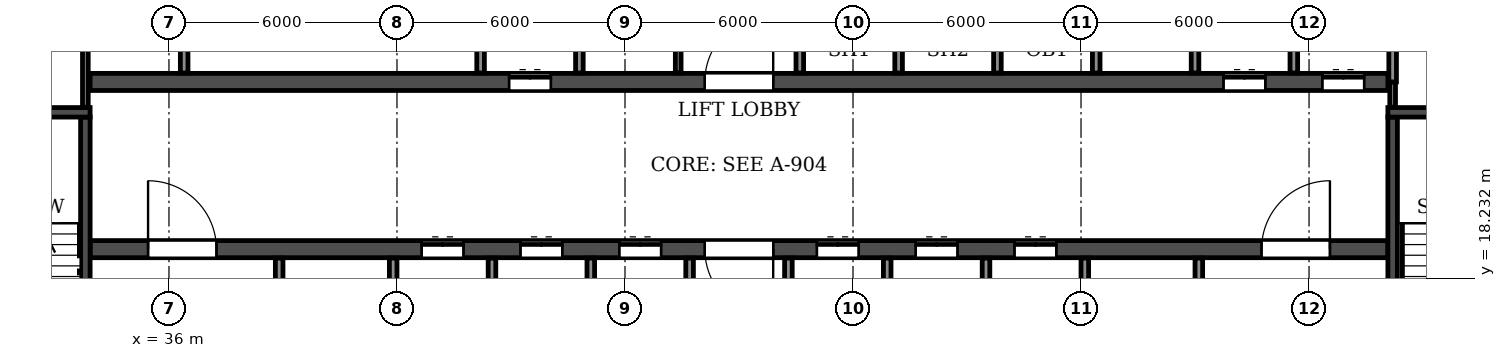
"""IFC4 building model, lengths in metres.
Left out: names, types, materials, properties, quantities, classifications, styles, units other than length and angle.
Written with IfcOpenShell. Run it as: python <this file> out.ifc"""

import sys

from ifc_helpers import new_model, si_unit, direction, frame, frame_2d, origin, place, context, subcontext, project, spatial, rectangle, extrude, element, fill, save


model = new_model("IFC4")
c1 = context("Model", 3, precision=1e-05, world=origin(), true_north=direction((0.0, 1.0)))
c2 = subcontext(c1, "Body", "Model", "MODEL_VIEW")
j1 = project(units=[si_unit("LENGTHUNIT", "METRE"), si_unit("PLANEANGLEUNIT", "RADIAN")], contexts=[c1])
p1 = place(None, origin())
s1 = spatial("IfcSite", under=j1, at=p1, CompositionType="ELEMENT")
p2 = place(p1, origin())
s2 = spatial("IfcBuilding", under=s1, at=p2, CompositionType="ELEMENT")
p3 = place(p2, frame((0.0, 0.0, 15.0)))
s3 = spatial("IfcBuildingStorey", under=s2, at=p3, CompositionType="ELEMENT", Elevation=15.0)
p4 = place(p3, frame((33.925, 19.0, 0.0), z_axis=(0.0, 0.0, 1.0), x_axis=(1.0, 0.0, 0.0)))
e1 = element("IfcWall", 1, at=p4, inside=s3, PredefinedType="SOLIDWALL", context=c2, shape_type="SweptSolid", body=[
    extrude(rectangle(XDim=34.15, YDim=0.45, at=frame_2d((17.075, 0.0))), origin(), (0.0, 0.0, 1.0), 3.92),
])
p5 = place(p4, frame((16.175, 0.0, 0.0)))
e2 = element("IfcOpeningElement", 2, at=p5, cuts=e1, PredefinedType="OPENING", context=c2, shape_type="SweptSolid", body=[
    extrude(rectangle(XDim=1.8, YDim=2.1, at=frame_2d((0.9, 1.05))), frame((0.0, 0.235, 0.0), z_axis=(0.0, -1.0, 0.0), x_axis=(1.0, 0.0, 0.0)), (0.0, 0.0, 1.0), 0.47),
])
p6 = place(p4, frame((1.525, 0.0, 0.0)))
e3 = element("IfcOpeningElement", 3, at=p6, cuts=e1, PredefinedType="OPENING", context=c2, shape_type="SweptSolid", body=[
    extrude(rectangle(XDim=1.8, YDim=2.1, at=frame_2d((0.9, 1.05))), frame((0.0, 0.235, 0.0), z_axis=(0.0, -1.0, 0.0), x_axis=(1.0, 0.0, 0.0)), (0.0, 0.0, 1.0), 0.47),
])
p7 = place(p4, frame((8.725, 0.0, 0.0)))
e4 = element("IfcOpeningElement", 4, at=p7, cuts=e1, PredefinedType="OPENING", context=c2, shape_type="SweptSolid", body=[
    extrude(rectangle(XDim=1.1, YDim=2.1, at=frame_2d((0.55, 1.05))), frame((0.0, 0.235, 0.0), z_axis=(0.0, -1.0, 0.0), x_axis=(1.0, 0.0, 0.0)), (0.0, 0.0, 1.0), 0.47),
])
p8 = place(p4, frame((11.325, 0.0, 0.0)))
e5 = element("IfcOpeningElement", 5, at=p8, cuts=e1, PredefinedType="OPENING", context=c2, shape_type="SweptSolid", body=[
    extrude(rectangle(XDim=1.1, YDim=2.1, at=frame_2d((0.55, 1.05))), frame((0.0, 0.235, 0.0), z_axis=(0.0, -1.0, 0.0), x_axis=(1.0, 0.0, 0.0)), (0.0, 0.0, 1.0), 0.47),
])
p9 = place(p4, frame((13.925, 0.0, 0.0)))
e6 = element("IfcOpeningElement", 6, at=p9, cuts=e1, PredefinedType="OPENING", context=c2, shape_type="SweptSolid", body=[
    extrude(rectangle(XDim=1.1, YDim=2.1, at=frame_2d((0.55, 1.05))), frame((0.0, 0.235, 0.0), z_axis=(0.0, -1.0, 0.0), x_axis=(1.0, 0.0, 0.0)), (0.0, 0.0, 1.0), 0.47),
])
p10 = place(p4, frame((19.125, 0.0, 0.0)))
e7 = element("IfcOpeningElement", 7, at=p10, cuts=e1, PredefinedType="OPENING", context=c2, shape_type="SweptSolid", body=[
    extrude(rectangle(XDim=1.1, YDim=2.1, at=frame_2d((0.55, 1.05))), frame((0.0, 0.235, 0.0), z_axis=(0.0, -1.0, 0.0), x_axis=(1.0, 0.0, 0.0)), (0.0, 0.0, 1.0), 0.47),
])
p11 = place(p4, frame((21.725, 0.0, 0.0)))
e8 = element("IfcOpeningElement", 8, at=p11, cuts=e1, PredefinedType="OPENING", context=c2, shape_type="SweptSolid", body=[
    extrude(rectangle(XDim=1.1, YDim=2.1, at=frame_2d((0.55, 1.05))), frame((0.0, 0.235, 0.0), z_axis=(0.0, -1.0, 0.0), x_axis=(1.0, 0.0, 0.0)), (0.0, 0.0, 1.0), 0.47),
])
p12 = place(p4, frame((24.325, 0.0, 0.0)))
e9 = element("IfcOpeningElement", 9, at=p12, cuts=e1, PredefinedType="OPENING", context=c2, shape_type="SweptSolid", body=[
    extrude(rectangle(XDim=1.1, YDim=2.1, at=frame_2d((0.55, 1.05))), frame((0.0, 0.235, 0.0), z_axis=(0.0, -1.0, 0.0), x_axis=(1.0, 0.0, 0.0)), (0.0, 0.0, 1.0), 0.47),
])
p13 = place(p4, frame((30.825, 0.0, 0.0)))
e10 = element("IfcOpeningElement", 10, at=p13, cuts=e1, PredefinedType="OPENING", context=c2, shape_type="SweptSolid", body=[
    extrude(rectangle(XDim=1.8, YDim=2.1, at=frame_2d((0.9, 1.05))), frame((0.0, 0.235, 0.0), z_axis=(0.0, -1.0, 0.0), x_axis=(1.0, 0.0, 0.0)), (0.0, 0.0, 1.0), 0.47),
])
p14 = place(p3, frame((33.925, 23.4, 0.0), z_axis=(0.0, 0.0, 1.0), x_axis=(1.0, 0.0, 0.0)))
e11 = element("IfcWall", 11, at=p14, inside=s3, PredefinedType="SOLIDWALL", context=c2, shape_type="SweptSolid", body=[
    extrude(rectangle(XDim=34.15, YDim=0.45, at=frame_2d((17.075, 0.0))), origin(), (0.0, 0.0, 1.0), 3.92),
])
p15 = place(p14, frame((16.175, 0.0, 0.0)))
e12 = element("IfcOpeningElement", 12, at=p15, cuts=e11, PredefinedType="OPENING", context=c2, shape_type="SweptSolid", body=[
    extrude(rectangle(XDim=1.8, YDim=2.1, at=frame_2d((0.9, 1.05))), frame((0.0, 0.235, 0.0), z_axis=(0.0, -1.0, 0.0), x_axis=(1.0, 0.0, 0.0)), (0.0, 0.0, 1.0), 0.47),
])
p16 = place(p14, frame((11.025, 0.0, 0.0)))
e13 = element("IfcOpeningElement", 13, at=p16, cuts=e11, PredefinedType="OPENING", context=c2, shape_type="SweptSolid", body=[
    extrude(rectangle(XDim=1.1, YDim=2.1, at=frame_2d((0.55, 1.05))), frame((0.0, 0.235, 0.0), z_axis=(0.0, -1.0, 0.0), x_axis=(1.0, 0.0, 0.0)), (0.0, 0.0, 1.0), 0.47),
])
p17 = place(p14, frame((29.825, 0.0, 0.0)))
e14 = element("IfcOpeningElement", 14, at=p17, cuts=e11, PredefinedType="OPENING", context=c2, shape_type="SweptSolid", body=[
    extrude(rectangle(XDim=1.1, YDim=2.1, at=frame_2d((0.55, 1.05))), frame((0.0, 0.235, 0.0), z_axis=(0.0, -1.0, 0.0), x_axis=(1.0, 0.0, 0.0)), (0.0, 0.0, 1.0), 0.47),
])
p18 = place(p14, frame((32.425, 0.0, 0.0)))
e15 = element("IfcOpeningElement", 15, at=p18, cuts=e11, PredefinedType="OPENING", context=c2, shape_type="SweptSolid", body=[
    extrude(rectangle(XDim=1.1, YDim=2.1, at=frame_2d((0.55, 1.05))), frame((0.0, 0.235, 0.0), z_axis=(0.0, -1.0, 0.0), x_axis=(1.0, 0.0, 0.0)), (0.0, 0.0, 1.0), 0.47),
])
p19 = place(p3, frame((33.8, 14.825, 0.0), z_axis=(0.0, 0.0, 1.0), x_axis=(0.0, 1.0, 0.0)))
e16 = element("IfcWall", 16, at=p19, inside=s3, PredefinedType="SOLIDWALL", context=c2, shape_type="SweptSolid", body=[
    extrude(rectangle(XDim=7.65, YDim=0.25, at=frame_2d((3.825, 0.0))), origin(), (0.0, 0.0, 1.0), 3.92),
])
p20 = place(p19, frame((0.475, 0.0, 0.0)))
e17 = element("IfcOpeningElement", 17, at=p20, cuts=e16, PredefinedType="OPENING", context=c2, shape_type="SweptSolid", body=[
    extrude(rectangle(XDim=1.0, YDim=2.1, at=frame_2d((0.5, 1.05))), frame((0.0, 0.135, 0.0), z_axis=(0.0, -1.0, 0.0), x_axis=(1.0, 0.0, 0.0)), (0.0, 0.0, 1.0), 0.27),
])
p21 = place(p3, frame((29.875, 22.6, 0.0), z_axis=(0.0, 0.0, 1.0), x_axis=(1.0, 0.0, 0.0)))
e18 = element("IfcWall", 18, at=p21, inside=s3, PredefinedType="SOLIDWALL", context=c2, shape_type="SweptSolid", body=[
    extrude(rectangle(XDim=4.05, YDim=0.25, at=frame_2d((2.025, 0.0))), origin(), (0.0, 0.0, 1.0), 3.92),
])
p22 = place(p3, frame((68.2, 14.825, 0.0), z_axis=(0.0, 0.0, 1.0), x_axis=(0.0, 1.0, 0.0)))
e19 = element("IfcWall", 19, at=p22, inside=s3, PredefinedType="SOLIDWALL", context=c2, shape_type="SweptSolid", body=[
    extrude(rectangle(XDim=7.65, YDim=0.25, at=frame_2d((3.825, 0.0))), origin(), (0.0, 0.0, 1.0), 3.92),
])
p23 = place(p22, frame((0.475, 0.0, 0.0)))
e20 = element("IfcOpeningElement", 20, at=p23, cuts=e19, PredefinedType="OPENING", context=c2, shape_type="SweptSolid", body=[
    extrude(rectangle(XDim=1.0, YDim=2.1, at=frame_2d((0.5, 1.05))), frame((0.0, 0.135, 0.0), z_axis=(0.0, -1.0, 0.0), x_axis=(1.0, 0.0, 0.0)), (0.0, 0.0, 1.0), 0.27),
])
p24 = place(p3, frame((68.075, 22.6, 0.0), z_axis=(0.0, 0.0, 1.0), x_axis=(1.0, 0.0, 0.0)))
e21 = element("IfcWall", 21, at=p24, inside=s3, PredefinedType="SOLIDWALL", context=c2, shape_type="SweptSolid", body=[
    extrude(rectangle(XDim=4.05, YDim=0.25, at=frame_2d((2.025, 0.0))), origin(), (0.0, 0.0, 1.0), 3.92),
])
p25 = place(p3, frame((49.4, 23.635, 0.0), z_axis=(0.0, 0.0, 1.0), x_axis=(0.0, 1.0, 0.0)))
e22 = element("IfcWall", 22, at=p25, inside=s3, PredefinedType="PARTITIONING", context=c2, shape_type="SweptSolid", body=[
    extrude(rectangle(XDim=3.93, YDim=0.15, at=frame_2d((1.965, 0.0))), origin(), (0.0, 0.0, 1.0), 3.92),
])
p26 = place(p3, frame((36.4, 23.635, 0.0), z_axis=(0.0, 0.0, 1.0), x_axis=(0.0, 1.0, 0.0)))
e23 = element("IfcWall", 23, at=p26, inside=s3, PredefinedType="PARTITIONING", context=c2, shape_type="SweptSolid", body=[
    extrude(rectangle(XDim=3.93, YDim=0.2, at=frame_2d((1.965, 0.0))), origin(), (0.0, 0.0, 1.0), 3.92),
])
p27 = place(p3, frame((33.8, 22.735, 0.0), z_axis=(0.0, 0.0, 1.0), x_axis=(0.0, 1.0, 0.0)))
e24 = element("IfcWall", 24, at=p27, inside=s3, PredefinedType="PARTITIONING", context=c2, shape_type="SweptSolid", body=[
    extrude(rectangle(XDim=4.83, YDim=0.15, at=frame_2d((2.415, 0.0))), origin(), (0.0, 0.0, 1.0), 3.92),
])
p28 = place(p3, frame((68.2, 22.735, 0.0), z_axis=(0.0, 0.0, 1.0), x_axis=(0.0, 1.0, 0.0)))
e25 = element("IfcWall", 25, at=p28, inside=s3, PredefinedType="PARTITIONING", context=c2, shape_type="SweptSolid", body=[
    extrude(rectangle(XDim=0.665, YDim=0.15, at=frame_2d((0.333, 0.0))), origin(), (0.0, 0.0, 1.0), 3.92),
])
p29 = place(p3, frame((38.9, 14.835, 0.0), z_axis=(0.0, 0.0, 1.0), x_axis=(0.0, 1.0, 0.0)))
e26 = element("IfcWall", 26, at=p29, inside=s3, PredefinedType="PARTITIONING", context=c2, shape_type="SweptSolid", body=[
    extrude(rectangle(XDim=3.93, YDim=0.2, at=frame_2d((1.965, 0.0))), origin(), (0.0, 0.0, 1.0), 3.92),
])
p30 = place(p29, frame((1.415, 0.0, 0.0)))
e27 = element("IfcOpeningElement", 27, at=p30, cuts=e26, PredefinedType="OPENING", context=c2, shape_type="SweptSolid", body=[
    extrude(rectangle(XDim=1.1, YDim=2.1, at=frame_2d((0.55, 1.05))), frame((0.0, 0.11, 0.0), z_axis=(0.0, -1.0, 0.0), x_axis=(1.0, 0.0, 0.0)), (0.0, 0.0, 1.0), 0.22),
])
for number, where, z_axis, x_axis in (
    (28, (41.9, 14.835, 0.0), (0.0, 0.0, 1.0), (0.0, 1.0, 0.0)),
    (29, (44.2, 23.635, 0.0), (0.0, 0.0, 1.0), (0.0, 1.0, 0.0)),
):
    element("IfcWall", number, at=place(p3, frame(where, z_axis=z_axis, x_axis=x_axis)), inside=s3, PredefinedType="PARTITIONING", context=c2, shape_type="SweptSolid", body=[
        extrude(rectangle(XDim=3.93, YDim=0.2, at=frame_2d((1.965, 0.0))), origin(), (0.0, 0.0, 1.0), 3.92),
    ])
p31 = place(p3, frame((44.5, 16.3, 0.0), z_axis=(0.0, 0.0, 1.0), x_axis=(0.0, 1.0, 0.0)))
e30 = element("IfcWall", 30, at=p31, inside=s3, PredefinedType="PARTITIONING", context=c2, shape_type="SweptSolid", body=[
    extrude(rectangle(XDim=2.465, YDim=0.2, at=frame_2d((1.232, 0.0))), origin(), (0.0, 0.0, 1.0), 3.92),
])
p32 = place(p3, frame((46.8, 23.635, 0.0), z_axis=(0.0, 0.0, 1.0), x_axis=(0.0, 1.0, 0.0)))
e31 = element("IfcWall", 31, at=p32, inside=s3, PredefinedType="PARTITIONING", context=c2, shape_type="SweptSolid", body=[
    extrude(rectangle(XDim=3.93, YDim=0.2, at=frame_2d((1.965, 0.0))), origin(), (0.0, 0.0, 1.0), 3.92),
])
for number, where, z_axis, x_axis in (
    (32, (47.1, 16.3, 0.0), (0.0, 0.0, 1.0), (0.0, 1.0, 0.0)),
    (33, (49.7, 16.3, 0.0), (0.0, 0.0, 1.0), (0.0, 1.0, 0.0)),
    (34, (52.3, 16.3, 0.0), (0.0, 0.0, 1.0), (0.0, 1.0, 0.0)),
):
    element("IfcWall", number, at=place(p3, frame(where, z_axis=z_axis, x_axis=x_axis)), inside=s3, PredefinedType="PARTITIONING", context=c2, shape_type="SweptSolid", body=[
        extrude(rectangle(XDim=2.465, YDim=0.2, at=frame_2d((1.232, 0.0))), origin(), (0.0, 0.0, 1.0), 3.92),
    ])
p33 = place(p3, frame((52.6, 23.635, 0.0), z_axis=(0.0, 0.0, 1.0), x_axis=(0.0, 1.0, 0.0)))
e35 = element("IfcWall", 35, at=p33, inside=s3, PredefinedType="PARTITIONING", context=c2, shape_type="SweptSolid", body=[
    extrude(rectangle(XDim=2.465, YDim=0.2, at=frame_2d((1.232, 0.0))), origin(), (0.0, 0.0, 1.0), 3.92),
])
p34 = place(p3, frame((54.9, 16.3, 0.0), z_axis=(0.0, 0.0, 1.0), x_axis=(0.0, 1.0, 0.0)))
e36 = element("IfcWall", 36, at=p34, inside=s3, PredefinedType="PARTITIONING", context=c2, shape_type="SweptSolid", body=[
    extrude(rectangle(XDim=2.465, YDim=0.2, at=frame_2d((1.232, 0.0))), origin(), (0.0, 0.0, 1.0), 3.92),
])
p35 = place(p3, frame((55.2, 23.635, 0.0), z_axis=(0.0, 0.0, 1.0), x_axis=(0.0, 1.0, 0.0)))
e37 = element("IfcWall", 37, at=p35, inside=s3, PredefinedType="PARTITIONING", context=c2, shape_type="SweptSolid", body=[
    extrude(rectangle(XDim=2.465, YDim=0.2, at=frame_2d((1.232, 0.0))), origin(), (0.0, 0.0, 1.0), 3.92),
])
p36 = place(p3, frame((57.5, 16.3, 0.0), z_axis=(0.0, 0.0, 1.0), x_axis=(0.0, 1.0, 0.0)))
e38 = element("IfcWall", 38, at=p36, inside=s3, PredefinedType="PARTITIONING", context=c2, shape_type="SweptSolid", body=[
    extrude(rectangle(XDim=2.465, YDim=0.2, at=frame_2d((1.232, 0.0))), origin(), (0.0, 0.0, 1.0), 3.92),
])
p37 = place(p3, frame((57.8, 23.635, 0.0), z_axis=(0.0, 0.0, 1.0), x_axis=(0.0, 1.0, 0.0)))
e39 = element("IfcWall", 39, at=p37, inside=s3, PredefinedType="PARTITIONING", context=c2, shape_type="SweptSolid", body=[
    extrude(rectangle(XDim=2.465, YDim=0.2, at=frame_2d((1.232, 0.0))), origin(), (0.0, 0.0, 1.0), 3.92),
])
p38 = place(p3, frame((60.1, 14.835, 0.0), z_axis=(0.0, 0.0, 1.0), x_axis=(0.0, 1.0, 0.0)))
e40 = element("IfcWall", 40, at=p38, inside=s3, PredefinedType="PARTITIONING", context=c2, shape_type="SweptSolid", body=[
    extrude(rectangle(XDim=3.93, YDim=0.2, at=frame_2d((1.965, 0.0))), origin(), (0.0, 0.0, 1.0), 3.92),
])
for number, where, z_axis, x_axis in (
    (41, (60.4, 23.635, 0.0), (0.0, 0.0, 1.0), (0.0, 1.0, 0.0)),
    (42, (63.0, 23.635, 0.0), (0.0, 0.0, 1.0), (0.0, 1.0, 0.0)),
):
    element("IfcWall", number, at=place(p3, frame(where, z_axis=z_axis, x_axis=x_axis)), inside=s3, PredefinedType="PARTITIONING", context=c2, shape_type="SweptSolid", body=[
        extrude(rectangle(XDim=2.465, YDim=0.2, at=frame_2d((1.232, 0.0))), origin(), (0.0, 0.0, 1.0), 3.92),
    ])
p39 = place(p3, frame((63.1, 14.835, 0.0), z_axis=(0.0, 0.0, 1.0), x_axis=(0.0, 1.0, 0.0)))
e43 = element("IfcWall", 43, at=p39, inside=s3, PredefinedType="PARTITIONING", context=c2, shape_type="SweptSolid", body=[
    extrude(rectangle(XDim=3.93, YDim=0.2, at=frame_2d((1.965, 0.0))), origin(), (0.0, 0.0, 1.0), 3.92),
])
p40 = place(p39, frame((1.415, 0.0, 0.0)))
e44 = element("IfcOpeningElement", 44, at=p40, cuts=e43, PredefinedType="OPENING", context=c2, shape_type="SweptSolid", body=[
    extrude(rectangle(XDim=1.1, YDim=2.1, at=frame_2d((0.55, 1.05))), frame((0.0, 0.11, 0.0), z_axis=(0.0, -1.0, 0.0), x_axis=(1.0, 0.0, 0.0)), (0.0, 0.0, 1.0), 0.22),
])
p41 = place(p3, frame((65.6, 23.635, 0.0), z_axis=(0.0, 0.0, 1.0), x_axis=(0.0, 1.0, 0.0)))
e45 = element("IfcWall", 45, at=p41, inside=s3, PredefinedType="PARTITIONING", context=c2, shape_type="SweptSolid", body=[
    extrude(rectangle(XDim=2.465, YDim=0.2, at=frame_2d((1.232, 0.0))), origin(), (0.0, 0.0, 1.0), 3.92),
])
p42 = place(p3, frame((68.2, 23.4, 0.0), z_axis=(0.0, 0.0, 1.0), x_axis=(0.0, 1.0, 0.0)))
e46 = element("IfcWall", 46, at=p42, inside=s3, PredefinedType="PARTITIONING", context=c2, shape_type="SweptSolid", body=[
    extrude(rectangle(XDim=2.7, YDim=0.2, at=frame_2d((1.35, 0.0))), origin(), (0.0, 0.0, 1.0), 3.92),
])
p43 = place(p15, origin())
e47 = element("IfcDoor", 47, at=p43, inside=s3, OperationType="DOUBLE_DOOR_SINGLE_SWING", PredefinedType="DOOR", context=c2, shape_type="SweptSolid", body=[
    extrude(rectangle(XDim=1.8, YDim=2.1, at=frame_2d((0.9, 1.05))), frame((0.0, 0.025, 0.0), z_axis=(0.0, -1.0, 0.0), x_axis=(1.0, 0.0, 0.0)), (0.0, 0.0, 1.0), 0.05),
])
fill(e12, e47)
p44 = place(p5, frame((1.8, 0.0, 0.0), z_axis=(0.0, 0.0, 1.0), x_axis=(-1.0, 0.0, 0.0)))
e48 = element("IfcDoor", 48, at=p44, inside=s3, OperationType="DOUBLE_DOOR_SINGLE_SWING", PredefinedType="DOOR", context=c2, shape_type="SweptSolid", body=[
    extrude(rectangle(XDim=1.8, YDim=2.1, at=frame_2d((0.9, 1.05))), frame((0.0, 0.025, 0.0), z_axis=(0.0, -1.0, 0.0), x_axis=(1.0, 0.0, 0.0)), (0.0, 0.0, 1.0), 0.05),
])
fill(e2, e48)
p45 = place(p6, origin())
e49 = element("IfcDoor", 49, at=p45, inside=s3, OperationType="DOUBLE_DOOR_SINGLE_SWING", PredefinedType="DOOR", context=c2, shape_type="SweptSolid", body=[
    extrude(rectangle(XDim=1.8, YDim=2.1, at=frame_2d((0.9, 1.05))), frame((0.0, 0.025, 0.0), z_axis=(0.0, -1.0, 0.0), x_axis=(1.0, 0.0, 0.0)), (0.0, 0.0, 1.0), 0.05),
])
fill(e3, e49)
p46 = place(p7, origin())
e50 = element("IfcDoor", 50, at=p46, inside=s3, OperationType="DOUBLE_DOOR_SLIDING", PredefinedType="DOOR", context=c2, shape_type="SweptSolid", body=[
    extrude(rectangle(XDim=1.1, YDim=2.1, at=frame_2d((0.55, 1.05))), frame((0.0, 0.025, 0.0), z_axis=(0.0, -1.0, 0.0), x_axis=(1.0, 0.0, 0.0)), (0.0, 0.0, 1.0), 0.05),
])
fill(e4, e50)
p47 = place(p16, origin())
e51 = element("IfcDoor", 51, at=p47, inside=s3, OperationType="DOUBLE_DOOR_SLIDING", PredefinedType="DOOR", context=c2, shape_type="SweptSolid", body=[
    extrude(rectangle(XDim=1.1, YDim=2.1, at=frame_2d((0.55, 1.05))), frame((0.0, 0.025, 0.0), z_axis=(0.0, -1.0, 0.0), x_axis=(1.0, 0.0, 0.0)), (0.0, 0.0, 1.0), 0.05),
])
fill(e13, e51)
p48 = place(p8, origin())
e52 = element("IfcDoor", 52, at=p48, inside=s3, OperationType="DOUBLE_DOOR_SLIDING", PredefinedType="DOOR", context=c2, shape_type="SweptSolid", body=[
    extrude(rectangle(XDim=1.1, YDim=2.1, at=frame_2d((0.55, 1.05))), frame((0.0, 0.025, 0.0), z_axis=(0.0, -1.0, 0.0), x_axis=(1.0, 0.0, 0.0)), (0.0, 0.0, 1.0), 0.05),
])
fill(e5, e52)
p49 = place(p9, origin())
e53 = element("IfcDoor", 53, at=p49, inside=s3, OperationType="DOUBLE_DOOR_SLIDING", PredefinedType="DOOR", context=c2, shape_type="SweptSolid", body=[
    extrude(rectangle(XDim=1.1, YDim=2.1, at=frame_2d((0.55, 1.05))), frame((0.0, 0.025, 0.0), z_axis=(0.0, -1.0, 0.0), x_axis=(1.0, 0.0, 0.0)), (0.0, 0.0, 1.0), 0.05),
])
fill(e6, e53)
p50 = place(p10, origin())
e54 = element("IfcDoor", 54, at=p50, inside=s3, OperationType="DOUBLE_DOOR_SLIDING", PredefinedType="DOOR", context=c2, shape_type="SweptSolid", body=[
    extrude(rectangle(XDim=1.1, YDim=2.1, at=frame_2d((0.55, 1.05))), frame((0.0, 0.025, 0.0), z_axis=(0.0, -1.0, 0.0), x_axis=(1.0, 0.0, 0.0)), (0.0, 0.0, 1.0), 0.05),
])
fill(e7, e54)
p51 = place(p11, origin())
e55 = element("IfcDoor", 55, at=p51, inside=s3, OperationType="DOUBLE_DOOR_SLIDING", PredefinedType="DOOR", context=c2, shape_type="SweptSolid", body=[
    extrude(rectangle(XDim=1.1, YDim=2.1, at=frame_2d((0.55, 1.05))), frame((0.0, 0.025, 0.0), z_axis=(0.0, -1.0, 0.0), x_axis=(1.0, 0.0, 0.0)), (0.0, 0.0, 1.0), 0.05),
])
fill(e8, e55)
p52 = place(p12, origin())
e56 = element("IfcDoor", 56, at=p52, inside=s3, OperationType="DOUBLE_DOOR_SLIDING", PredefinedType="DOOR", context=c2, shape_type="SweptSolid", body=[
    extrude(rectangle(XDim=1.1, YDim=2.1, at=frame_2d((0.55, 1.05))), frame((0.0, 0.025, 0.0), z_axis=(0.0, -1.0, 0.0), x_axis=(1.0, 0.0, 0.0)), (0.0, 0.0, 1.0), 0.05),
])
fill(e9, e56)
p53 = place(p17, origin())
e57 = element("IfcDoor", 57, at=p53, inside=s3, OperationType="DOUBLE_DOOR_SLIDING", PredefinedType="DOOR", context=c2, shape_type="SweptSolid", body=[
    extrude(rectangle(XDim=1.1, YDim=2.1, at=frame_2d((0.55, 1.05))), frame((0.0, 0.025, 0.0), z_axis=(0.0, -1.0, 0.0), x_axis=(1.0, 0.0, 0.0)), (0.0, 0.0, 1.0), 0.05),
])
fill(e14, e57)
p54 = place(p13, origin())
e58 = element("IfcDoor", 58, at=p54, inside=s3, OperationType="DOUBLE_DOOR_SINGLE_SWING", PredefinedType="DOOR", context=c2, shape_type="SweptSolid", body=[
    extrude(rectangle(XDim=1.8, YDim=2.1, at=frame_2d((0.9, 1.05))), frame((0.0, 0.025, 0.0), z_axis=(0.0, -1.0, 0.0), x_axis=(1.0, 0.0, 0.0)), (0.0, 0.0, 1.0), 0.05),
])
fill(e10, e58)
p55 = place(p18, origin())
e59 = element("IfcDoor", 59, at=p55, inside=s3, OperationType="DOUBLE_DOOR_SLIDING", PredefinedType="DOOR", context=c2, shape_type="SweptSolid", body=[
    extrude(rectangle(XDim=1.1, YDim=2.1, at=frame_2d((0.55, 1.05))), frame((0.0, 0.025, 0.0), z_axis=(0.0, -1.0, 0.0), x_axis=(1.0, 0.0, 0.0)), (0.0, 0.0, 1.0), 0.05),
])
fill(e15, e59)
save(model, sys.argv[1])
